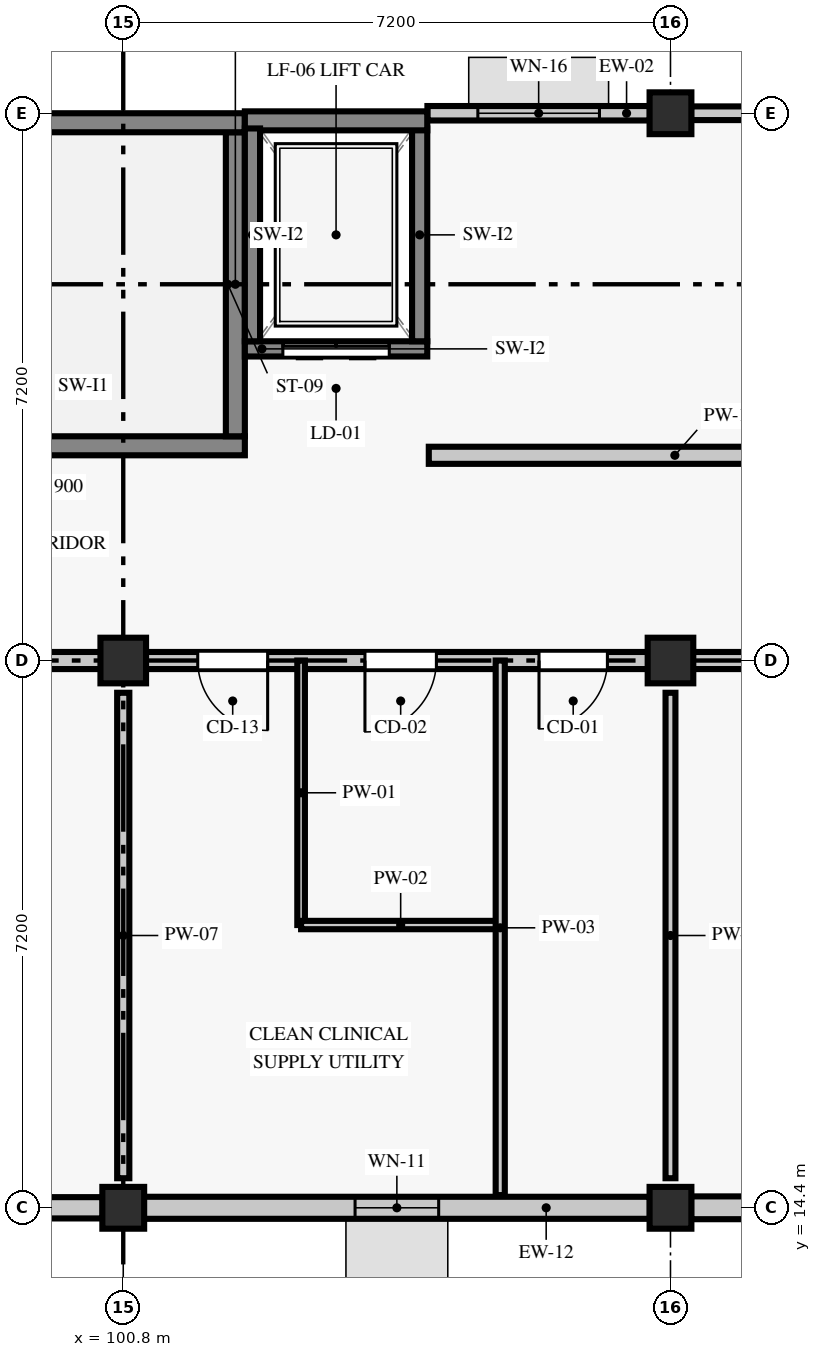
"""IFC4 building model, lengths in metres.
Left out: names, types, materials, properties, quantities, classifications, styles, units other than length and angle.
Written with IfcOpenShell. Run it as: python <this file> out.ifc"""

import sys

from ifc_helpers import new_model, si_unit, direction, frame, frame_2d, origin, origin_2d, place, context, subcontext, project, spatial, rectangle, extrude, element, fill, save


model = new_model("IFC4")
c1 = context("Model", 3, precision=1e-05, world=origin(), true_north=direction((0.0, 1.0)))
c2 = subcontext(c1, "Body", "Model", "MODEL_VIEW")
j1 = project(units=[si_unit("LENGTHUNIT", "METRE"), si_unit("PLANEANGLEUNIT", "RADIAN")], contexts=[c1])
p1 = place(None, origin())
s1 = spatial("IfcSite", under=j1, at=p1, CompositionType="ELEMENT")
p2 = place(p1, origin())
s2 = spatial("IfcBuilding", under=s1, at=p2, CompositionType="ELEMENT")
p3 = place(p2, frame((0.0, 0.0, 13.8)))
s3 = spatial("IfcBuildingStorey", under=s2, at=p3, CompositionType="ELEMENT", Elevation=13.8)
p4 = place(p3, frame((100.8, 14.4, 0.0), z_axis=(0.0, 0.0, 1.0), x_axis=(1.0, 0.0, 0.0)))
e1 = element("IfcColumn", 1, at=p4, inside=s3, PredefinedType="COLUMN", context=c2, shape_type="SweptSolid", body=[
    extrude(rectangle(XDim=0.55, YDim=0.55, at=origin_2d()), origin(), (0.0, 0.0, 1.0), 3.88),
])
p5 = place(p3, frame((100.8, 21.6, 0.0), z_axis=(0.0, 0.0, 1.0), x_axis=(1.0, 0.0, 0.0)))
e2 = element("IfcColumn", 2, at=p5, inside=s3, PredefinedType="COLUMN", context=c2, shape_type="SweptSolid", body=[
    extrude(rectangle(XDim=0.6, YDim=0.6, at=origin_2d()), origin(), (0.0, 0.0, 1.0), 3.88),
])
p6 = place(p3, frame((108.0, 14.4, 0.0), z_axis=(0.0, 0.0, 1.0), x_axis=(1.0, 0.0, 0.0)))
e3 = element("IfcColumn", 3, at=p6, inside=s3, PredefinedType="COLUMN", context=c2, shape_type="SweptSolid", body=[
    extrude(rectangle(XDim=0.55, YDim=0.55, at=origin_2d()), origin(), (0.0, 0.0, 1.0), 3.88),
])
p7 = place(p3, frame((108.0, 21.6, 0.0), z_axis=(0.0, 0.0, 1.0), x_axis=(1.0, 0.0, 0.0)))
e4 = element("IfcColumn", 4, at=p7, inside=s3, PredefinedType="COLUMN", context=c2, shape_type="SweptSolid", body=[
    extrude(rectangle(XDim=0.6, YDim=0.6, at=origin_2d()), origin(), (0.0, 0.0, 1.0), 3.88),
])
p8 = place(p3, frame((108.0, 28.8, 0.0), z_axis=(0.0, 0.0, 1.0), x_axis=(1.0, 0.0, 0.0)))
e5 = element("IfcColumn", 5, at=p8, inside=s3, PredefinedType="COLUMN", context=c2, shape_type="SweptSolid", body=[
    extrude(rectangle(XDim=0.55, YDim=0.55, at=origin_2d()), origin(), (0.0, 0.0, 1.0), 3.88),
])
p9 = place(p3, frame((93.871, 14.4, 0.0), z_axis=(0.0, 0.0, 1.0), x_axis=(1.0, 0.0, 0.0)))
e6 = element("IfcWall", 6, at=p9, inside=s3, PredefinedType="STANDARD", context=c2, shape_type="SweptSolid", body=[
    extrude(rectangle(XDim=6.658, YDim=0.28, at=frame_2d((3.329, 0.0))), origin(), (0.0, 0.0, 1.0), 3.23),
])
p10 = place(p9, frame((2.304, 0.0, 0.9)))
e7 = element("IfcOpeningElement", 7, at=p10, cuts=e6, PredefinedType="OPENING", context=c2, shape_type="SweptSolid", body=[
    extrude(rectangle(XDim=2.05, YDim=1.3, at=frame_2d((1.025, 0.65))), frame((0.0, 0.15, 0.0), z_axis=(0.0, -1.0, 0.0), x_axis=(1.0, 0.0, 0.0)), (0.0, 0.0, 1.0), 0.3),
])
p11 = place(p3, frame((101.071, 14.4, 0.0), z_axis=(0.0, 0.0, 1.0), x_axis=(1.0, 0.0, 0.0)))
e8 = element("IfcWall", 8, at=p11, inside=s3, PredefinedType="STANDARD", context=c2, shape_type="SweptSolid", body=[
    extrude(rectangle(XDim=6.658, YDim=0.29, at=frame_2d((3.329, 0.0))), origin(), (0.0, 0.0, 1.0), 3.23),
])
p12 = place(p11, frame((2.779, 0.0, 0.9)))
e9 = element("IfcOpeningElement", 9, at=p12, cuts=e8, PredefinedType="OPENING", context=c2, shape_type="SweptSolid", body=[
    extrude(rectangle(XDim=1.1, YDim=1.42, at=frame_2d((0.55, 0.71))), frame((0.0, 0.155, 0.0), z_axis=(0.0, -1.0, 0.0), x_axis=(1.0, 0.0, 0.0)), (0.0, 0.0, 1.0), 0.31),
])
p13 = place(p3, frame((108.271, 14.4, 0.0), z_axis=(0.0, 0.0, 1.0), x_axis=(1.0, 0.0, 0.0)))
e10 = element("IfcWall", 10, at=p13, inside=s3, PredefinedType="STANDARD", context=c2, shape_type="SweptSolid", body=[
    extrude(rectangle(XDim=6.658, YDim=0.3, at=frame_2d((3.329, 0.0))), origin(), (0.0, 0.0, 1.0), 3.23),
])
p14 = place(p13, frame((2.729, 0.0, 0.9)))
e11 = element("IfcOpeningElement", 11, at=p14, cuts=e10, PredefinedType="OPENING", context=c2, shape_type="SweptSolid", body=[
    extrude(rectangle(XDim=1.2, YDim=1.42, at=frame_2d((0.6, 0.71))), frame((0.0, 0.16, 0.0), z_axis=(0.0, -1.0, 0.0), x_axis=(1.0, 0.0, 0.0)), (0.0, 0.0, 1.0), 0.32),
])
p15 = place(p3, frame((113.598, 28.8, 0.0), z_axis=(0.0, 0.0, 1.0), x_axis=(-1.0, 0.0, 0.0)))
e12 = element("IfcWall", 12, at=p15, inside=s3, PredefinedType="STANDARD", context=c2, shape_type="SweptSolid", body=[
    extrude(rectangle(XDim=5.327, YDim=0.18, at=frame_2d((2.664, 0.0))), origin(), (0.0, 0.0, 1.0), 3.88),
])
p16 = place(p15, frame((1.914, 0.0, 0.9)))
e13 = element("IfcOpeningElement", 13, at=p16, cuts=e12, PredefinedType="OPENING", context=c2, shape_type="SweptSolid", body=[
    extrude(rectangle(XDim=1.5, YDim=1.42, at=frame_2d((0.75, 0.71))), frame((0.0, 0.1, 0.0), z_axis=(0.0, -1.0, 0.0), x_axis=(1.0, 0.0, 0.0)), (0.0, 0.0, 1.0), 0.2),
])
p17 = place(p3, frame((107.729, 28.8, 0.0), z_axis=(0.0, 0.0, 1.0), x_axis=(-1.0, 0.0, 0.0)))
e14 = element("IfcWall", 14, at=p17, inside=s3, PredefinedType="STANDARD", context=c2, shape_type="SweptSolid", body=[
    extrude(rectangle(XDim=2.927, YDim=0.19, at=frame_2d((1.463, 0.0))), origin(), (0.0, 0.0, 1.0), 3.88),
])
p18 = place(p17, frame((0.664, 0.0, 0.9)))
e15 = element("IfcOpeningElement", 15, at=p18, cuts=e14, PredefinedType="OPENING", context=c2, shape_type="SweptSolid", body=[
    extrude(rectangle(XDim=1.6, YDim=1.42, at=frame_2d((0.8, 0.71))), frame((0.0, 0.105, 0.0), z_axis=(0.0, -1.0, 0.0), x_axis=(1.0, 0.0, 0.0)), (0.0, 0.0, 1.0), 0.21),
])
p19 = place(p3, frame((93.6, 24.425, 0.0), z_axis=(0.0, 0.0, 1.0), x_axis=(1.0, 0.0, 0.0)))
e16 = element("IfcWall", 16, at=p19, inside=s3, PredefinedType="SHEAR", context=c2, shape_type="SweptSolid", body=[
    extrude(rectangle(XDim=8.8, YDim=0.25, at=frame_2d((4.4, 0.0))), origin(), (0.0, 0.0, 1.0), 3.88),
])
p20 = place(p19, frame((0.3, 0.0, 0.0)))
e17 = element("IfcOpeningElement", 17, at=p20, cuts=e16, PredefinedType="OPENING", context=c2, shape_type="SweptSolid", body=[
    extrude(rectangle(XDim=1.5, YDim=2.15, at=frame_2d((0.75, 1.075))), frame((0.0, 0.135, 0.0), z_axis=(0.0, -1.0, 0.0), x_axis=(1.0, 0.0, 0.0)), (0.0, 0.0, 1.0), 0.27),
])
p21 = place(p3, frame((102.275, 24.55, 0.0), z_axis=(0.0, 0.0, 1.0), x_axis=(0.0, 1.0, 0.0)))
e18 = element("IfcWall", 18, at=p21, inside=s3, PredefinedType="SHEAR", context=c2, shape_type="SweptSolid", body=[
    extrude(rectangle(XDim=4.0, YDim=0.25, at=frame_2d((2.0, 0.0))), origin(), (0.0, 0.0, 1.0), 3.88),
])
p22 = place(p3, frame((102.4, 28.675, 0.0), z_axis=(0.0, 0.0, 1.0), x_axis=(-1.0, 0.0, 0.0)))
e19 = element("IfcWall", 19, at=p22, inside=s3, PredefinedType="SHEAR", context=c2, shape_type="SweptSolid", body=[
    extrude(rectangle(XDim=8.8, YDim=0.25, at=frame_2d((4.4, 0.0))), origin(), (0.0, 0.0, 1.0), 3.88),
])
p23 = place(p22, frame((7.27, 0.0, 0.92)))
e20 = element("IfcOpeningElement", 20, at=p23, cuts=e19, PredefinedType="OPENING", context=c2, shape_type="SweptSolid", body=[
    extrude(rectangle(XDim=1.18, YDim=1.48, at=frame_2d((0.59, 0.74))), frame((0.0, 0.135, 0.0), z_axis=(0.0, -1.0, 0.0), x_axis=(1.0, 0.0, 0.0)), (0.0, 0.0, 1.0), 0.27),
])
p24 = place(p3, frame((102.4, 25.7, 0.0), z_axis=(0.0, 0.0, 1.0), x_axis=(1.0, 0.0, 0.0)))
e21 = element("IfcWall", 21, at=p24, inside=s3, PredefinedType="SHEAR", context=c2, shape_type="SweptSolid", body=[
    extrude(rectangle(XDim=2.4, YDim=0.2, at=frame_2d((1.2, 0.0))), origin(), (0.0, 0.0, 1.0), 3.88),
])
p25 = place(p24, frame((0.5, 0.0, 0.0)))
e22 = element("IfcOpeningElement", 22, at=p25, cuts=e21, PredefinedType="OPENING", context=c2, shape_type="SweptSolid", body=[
    extrude(rectangle(XDim=1.4, YDim=2.15, at=frame_2d((0.7, 1.075))), frame((0.0, 0.11, 0.0), z_axis=(0.0, -1.0, 0.0), x_axis=(1.0, 0.0, 0.0)), (0.0, 0.0, 1.0), 0.22),
])
p26 = place(p3, frame((104.7, 25.8, 0.0), z_axis=(0.0, 0.0, 1.0), x_axis=(0.0, 1.0, 0.0)))
e23 = element("IfcWall", 23, at=p26, inside=s3, PredefinedType="SHEAR", context=c2, shape_type="SweptSolid", body=[
    extrude(rectangle(XDim=2.8, YDim=0.2, at=frame_2d((1.4, 0.0))), origin(), (0.0, 0.0, 1.0), 3.88),
])
p27 = place(p3, frame((104.8, 28.7, 0.0), z_axis=(0.0, 0.0, 1.0), x_axis=(-1.0, 0.0, 0.0)))
e24 = element("IfcWall", 24, at=p27, inside=s3, PredefinedType="SHEAR", context=c2, shape_type="SweptSolid", body=[
    extrude(rectangle(XDim=2.4, YDim=0.25, at=frame_2d((1.2, 0.0))), origin(), (0.0, 0.0, 1.0), 3.88),
])
p28 = place(p3, frame((102.5, 28.6, 0.0), z_axis=(0.0, 0.0, 1.0), x_axis=(0.0, -1.0, 0.0)))
e25 = element("IfcWall", 25, at=p28, inside=s3, PredefinedType="SHEAR", context=c2, shape_type="SweptSolid", body=[
    extrude(rectangle(XDim=2.8, YDim=0.2, at=frame_2d((1.4, 0.0))), origin(), (0.0, 0.0, 1.0), 3.88),
])
p29 = place(p3, frame((93.989, 21.6, 0.0), z_axis=(0.0, 0.0, 1.0), x_axis=(1.0, 0.0, 0.0)))
e26 = element("IfcWall", 26, at=p29, inside=s3, PredefinedType="PARTITIONING", context=c2, shape_type="SweptSolid", body=[
    extrude(rectangle(XDim=28.022, YDim=0.225, at=frame_2d((14.011, 0.0))), origin(), (0.0, 0.0, 1.0), 3.18),
])
p30 = place(p29, frame((2.729, 0.0, 0.0)))
e27 = element("IfcOpeningElement", 27, at=p30, cuts=e26, PredefinedType="OPENING", context=c2, shape_type="SweptSolid", body=[
    extrude(rectangle(XDim=1.05, YDim=2.13, at=frame_2d((0.525, 1.065))), frame((0.0, 0.123, 0.0), z_axis=(0.0, -1.0, 0.0), x_axis=(1.0, 0.0, 0.0)), (0.0, 0.0, 1.0), 0.245),
])
p31 = place(p29, frame((7.791, 0.0, 0.0)))
e28 = element("IfcOpeningElement", 28, at=p31, cuts=e26, PredefinedType="OPENING", context=c2, shape_type="SweptSolid", body=[
    extrude(rectangle(XDim=0.92, YDim=2.18, at=frame_2d((0.46, 1.09))), frame((0.0, 0.123, 0.0), z_axis=(0.0, -1.0, 0.0), x_axis=(1.0, 0.0, 0.0)), (0.0, 0.0, 1.0), 0.245),
])
p32 = place(p29, frame((9.991, 0.0, 0.0)))
e29 = element("IfcOpeningElement", 29, at=p32, cuts=e26, PredefinedType="OPENING", context=c2, shape_type="SweptSolid", body=[
    extrude(rectangle(XDim=0.94, YDim=2.08, at=frame_2d((0.47, 1.04))), frame((0.0, 0.123, 0.0), z_axis=(0.0, -1.0, 0.0), x_axis=(1.0, 0.0, 0.0)), (0.0, 0.0, 1.0), 0.245),
])
p33 = place(p29, frame((12.281, 0.0, 0.0)))
e30 = element("IfcOpeningElement", 30, at=p33, cuts=e26, PredefinedType="OPENING", context=c2, shape_type="SweptSolid", body=[
    extrude(rectangle(XDim=0.9, YDim=2.08, at=frame_2d((0.45, 1.04))), frame((0.0, 0.123, 0.0), z_axis=(0.0, -1.0, 0.0), x_axis=(1.0, 0.0, 0.0)), (0.0, 0.0, 1.0), 0.245),
])
p34 = place(p29, frame((16.756, 0.0, 0.0)))
e31 = element("IfcOpeningElement", 31, at=p34, cuts=e26, PredefinedType="OPENING", context=c2, shape_type="SweptSolid", body=[
    extrude(rectangle(XDim=0.97, YDim=2.18, at=frame_2d((0.485, 1.09))), frame((0.0, 0.123, 0.0), z_axis=(0.0, -1.0, 0.0), x_axis=(1.0, 0.0, 0.0)), (0.0, 0.0, 1.0), 0.245),
])
p35 = place(p29, frame((24.114, 0.0, 0.0)))
e32 = element("IfcOpeningElement", 32, at=p35, cuts=e26, PredefinedType="OPENING", context=c2, shape_type="SweptSolid", body=[
    extrude(rectangle(XDim=1.03, YDim=2.18, at=frame_2d((0.515, 1.09))), frame((0.0, 0.123, 0.0), z_axis=(0.0, -1.0, 0.0), x_axis=(1.0, 0.0, 0.0)), (0.0, 0.0, 1.0), 0.245),
])
p36 = place(p3, frame((100.8, 14.789, 0.0), z_axis=(0.0, 0.0, 1.0), x_axis=(0.0, 1.0, 0.0)))
e33 = element("IfcWall", 33, at=p36, inside=s3, PredefinedType="PARTITIONING", context=c2, shape_type="SweptSolid", body=[
    extrude(rectangle(XDim=6.387, YDim=0.16, at=frame_2d((3.193, 0.0))), origin(), (0.0, 0.0, 1.0), 3.33),
])
p37 = place(p3, frame((103.14, 18.12, 0.0), z_axis=(0.0, 0.0, 1.0), x_axis=(0.0, 1.0, 0.0)))
e34 = element("IfcWall", 34, at=p37, inside=s3, PredefinedType="PARTITIONING", context=c2, shape_type="SweptSolid", body=[
    extrude(rectangle(XDim=3.48, YDim=0.1, at=frame_2d((1.74, 0.0))), origin(), (0.0, 0.0, 1.0), 3.18),
])
p38 = place(p3, frame((103.14, 18.12, 0.0), z_axis=(0.0, 0.0, 1.0), x_axis=(1.0, 0.0, 0.0)))
e35 = element("IfcWall", 35, at=p38, inside=s3, PredefinedType="PARTITIONING", context=c2, shape_type="SweptSolid", body=[
    extrude(rectangle(XDim=2.62, YDim=0.11, at=frame_2d((1.31, 0.0))), origin(), (0.0, 0.0, 1.0), 3.58),
])
p39 = place(p3, frame((105.76, 14.567, 0.0), z_axis=(0.0, 0.0, 1.0), x_axis=(0.0, 1.0, 0.0)))
e36 = element("IfcWall", 36, at=p39, inside=s3, PredefinedType="PARTITIONING", context=c2, shape_type="SweptSolid", body=[
    extrude(rectangle(XDim=7.033, YDim=0.12, at=frame_2d((3.517, 0.0))), origin(), (0.0, 0.0, 1.0), 3.18),
])
p40 = place(p3, frame((108.0, 14.789, 0.0), z_axis=(0.0, 0.0, 1.0), x_axis=(0.0, 1.0, 0.0)))
e37 = element("IfcWall", 37, at=p40, inside=s3, PredefinedType="PARTITIONING", context=c2, shape_type="SweptSolid", body=[
    extrude(rectangle(XDim=6.387, YDim=0.13, at=frame_2d((3.193, 0.0))), origin(), (0.0, 0.0, 1.0), 3.33),
])
p41 = place(p3, frame((104.82, 24.3, 0.0), z_axis=(0.0, 0.0, 1.0), x_axis=(1.0, 0.0, 0.0)))
e38 = element("IfcWall", 38, at=p41, inside=s3, PredefinedType="PARTITIONING", context=c2, shape_type="SweptSolid", body=[
    extrude(rectangle(XDim=8.76, YDim=0.225, at=frame_2d((4.38, 0.0))), origin(), (0.0, 0.0, 1.0), 3.33),
])
p42 = place(p41, frame((6.525, 0.0, 0.0)))
e39 = element("IfcOpeningElement", 39, at=p42, cuts=e38, PredefinedType="OPENING", context=c2, shape_type="SweptSolid", body=[
    extrude(rectangle(XDim=1.08, YDim=2.18, at=frame_2d((0.54, 1.09))), frame((0.0, 0.123, 0.0), z_axis=(0.0, -1.0, 0.0), x_axis=(1.0, 0.0, 0.0)), (0.0, 0.0, 1.0), 0.245),
])
p43 = place(p12, origin())
e40 = element("IfcWindow", 40, at=p43, inside=s3, PartitioningType="SINGLE_PANEL", PredefinedType="WINDOW", context=c2, shape_type="SweptSolid", body=[
    extrude(rectangle(XDim=1.1, YDim=1.42, at=frame_2d((0.55, 0.71))), frame((0.0, 0.03, 0.0), z_axis=(0.0, -1.0, 0.0), x_axis=(1.0, 0.0, 0.0)), (0.0, 0.0, 1.0), 0.06),
])
fill(e9, e40)
p44 = place(p18, origin())
e41 = element("IfcWindow", 41, at=p44, inside=s3, PartitioningType="SINGLE_PANEL", PredefinedType="WINDOW", context=c2, shape_type="SweptSolid", body=[
    extrude(rectangle(XDim=1.6, YDim=1.42, at=frame_2d((0.8, 0.71))), frame((0.0, 0.03, 0.0), z_axis=(0.0, -1.0, 0.0), x_axis=(1.0, 0.0, 0.0)), (0.0, 0.0, 1.0), 0.06),
])
fill(e15, e41)
p45 = place(p25, frame((1.4, 0.0, 0.0), z_axis=(0.0, 0.0, 1.0), x_axis=(-1.0, 0.0, 0.0)))
e42 = element("IfcDoor", 42, at=p45, inside=s3, OperationType="DOUBLE_DOOR_SLIDING", PredefinedType="DOOR", context=c2, shape_type="SweptSolid", body=[
    extrude(rectangle(XDim=1.4, YDim=2.15, at=frame_2d((0.7, 1.075))), frame((0.0, 0.025, 0.0), z_axis=(0.0, -1.0, 0.0), x_axis=(1.0, 0.0, 0.0)), (0.0, 0.0, 1.0), 0.05),
])
fill(e22, e42)
p46 = place(p31, frame((0.92, 0.0, 0.0), z_axis=(0.0, 0.0, 1.0), x_axis=(-1.0, 0.0, 0.0)))
e43 = element("IfcDoor", 43, at=p46, inside=s3, OperationType="SINGLE_SWING_LEFT", PredefinedType="DOOR", context=c2, shape_type="SweptSolid", body=[
    extrude(rectangle(XDim=0.92, YDim=2.18, at=frame_2d((0.46, 1.09))), frame((0.0, 0.025, 0.0), z_axis=(0.0, -1.0, 0.0), x_axis=(1.0, 0.0, 0.0)), (0.0, 0.0, 1.0), 0.05),
])
fill(e28, e43)
p47 = place(p32, frame((0.94, 0.0, 0.0), z_axis=(0.0, 0.0, 1.0), x_axis=(-1.0, 0.0, 0.0)))
e44 = element("IfcDoor", 44, at=p47, inside=s3, OperationType="SINGLE_SWING_RIGHT", PredefinedType="DOOR", context=c2, shape_type="SweptSolid", body=[
    extrude(rectangle(XDim=0.94, YDim=2.08, at=frame_2d((0.47, 1.04))), frame((0.0, 0.025, 0.0), z_axis=(0.0, -1.0, 0.0), x_axis=(1.0, 0.0, 0.0)), (0.0, 0.0, 1.0), 0.05),
])
fill(e29, e44)
p48 = place(p33, frame((0.9, 0.0, 0.0), z_axis=(0.0, 0.0, 1.0), x_axis=(-1.0, 0.0, 0.0)))
e45 = element("IfcDoor", 45, at=p48, inside=s3, OperationType="SINGLE_SWING_RIGHT", PredefinedType="DOOR", context=c2, shape_type="SweptSolid", body=[
    extrude(rectangle(XDim=0.9, YDim=2.08, at=frame_2d((0.45, 1.04))), frame((0.0, 0.025, 0.0), z_axis=(0.0, -1.0, 0.0), x_axis=(1.0, 0.0, 0.0)), (0.0, 0.0, 1.0), 0.05),
])
fill(e30, e45)
save(model, sys.argv[1])
